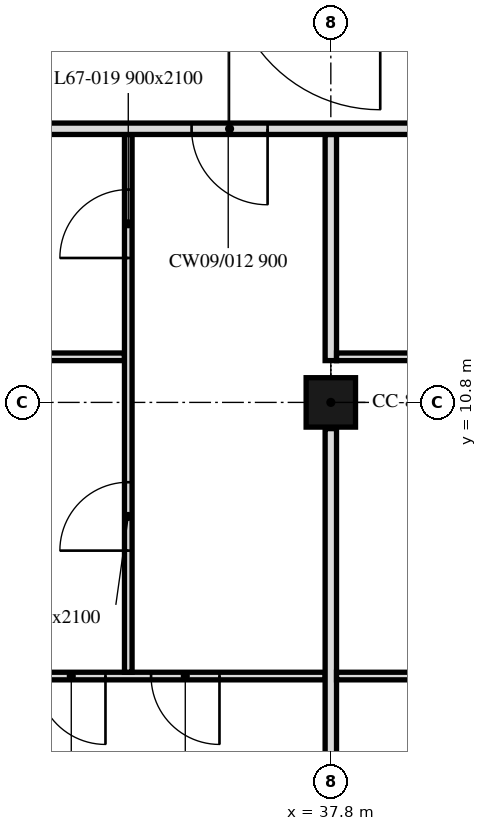
"""IFC4 building model, lengths in metres.
Left out: names, types, materials, properties, quantities, classifications, styles, units other than length and angle.
Written with IfcOpenShell. Run it as: python <this file> out.ifc"""

import sys

from ifc_helpers import new_model, si_unit, direction, frame, frame_2d, origin, origin_2d, place, context, subcontext, project, spatial, rectangle, extrude, element, fill, save


model = new_model("IFC4")
c1 = context("Model", 3, precision=1e-05, world=origin(), true_north=direction((0.0, 1.0)))
c2 = subcontext(c1, "Body", "Model", "MODEL_VIEW")
j1 = project(units=[si_unit("LENGTHUNIT", "METRE"), si_unit("PLANEANGLEUNIT", "RADIAN")], contexts=[c1])
p1 = place(None, origin())
s1 = spatial("IfcSite", under=j1, at=p1, CompositionType="ELEMENT")
p2 = place(p1, origin())
s2 = spatial("IfcBuilding", under=s1, at=p2, CompositionType="ELEMENT")
p3 = place(p2, frame((0.0, 0.0, 275.2)))
s3 = spatial("IfcBuildingStorey", under=s2, at=p3, CompositionType="ELEMENT", Elevation=275.2)
p4 = place(p3, frame((37.8, 10.8, 0.0), z_axis=(0.0, 0.0, 1.0), x_axis=(1.0, 0.0, 0.0)))
e1 = element("IfcColumn", 1, at=p4, inside=s3, PredefinedType="COLUMN", context=c2, shape_type="SweptSolid", body=[
    extrude(rectangle(XDim=0.65, YDim=0.65, at=origin_2d()), origin(), (0.0, 0.0, 1.0), 3.0),
])
p5 = place(p3, frame((37.725, 7.2, 0.0), z_axis=(0.0, 0.0, 1.0), x_axis=(-1.0, 0.0, 0.0)))
e2 = element("IfcWall", 2, at=p5, inside=s3, PredefinedType="PARTITIONING", context=c2, shape_type="SweptSolid", body=[
    extrude(rectangle(XDim=5.25, YDim=0.1, at=frame_2d((2.625, 0.0))), origin(), (0.0, 0.0, 1.0), 3.0),
])
p6 = place(p5, frame((2.89, 0.0, 0.0)))
e3 = element("IfcOpeningElement", 3, at=p6, cuts=e2, PredefinedType="OPENING", context=c2, shape_type="SweptSolid", body=[
    extrude(rectangle(XDim=0.9, YDim=2.1, at=frame_2d((0.45, 1.05))), frame((0.0, 0.05, 0.0), z_axis=(0.0, -1.0, 0.0), x_axis=(1.0, 0.0, 0.0)), (0.0, 0.0, 1.0), 0.1),
])
p7 = place(p5, frame((1.39, 0.0, 0.0)))
e4 = element("IfcOpeningElement", 4, at=p7, cuts=e2, PredefinedType="OPENING", context=c2, shape_type="SweptSolid", body=[
    extrude(rectangle(XDim=0.9, YDim=2.1, at=frame_2d((0.45, 1.05))), frame((0.0, 0.05, 0.0), z_axis=(0.0, -1.0, 0.0), x_axis=(1.0, 0.0, 0.0)), (0.0, 0.0, 1.0), 0.1),
])
p8 = place(p3, frame((35.085, 11.4, 0.0), z_axis=(0.0, 0.0, 1.0), x_axis=(-1.0, 0.0, 0.0)))
e5 = element("IfcWall", 5, at=p8, inside=s3, PredefinedType="PARTITIONING", context=c2, shape_type="SweptSolid", body=[
    extrude(rectangle(XDim=5.585, YDim=0.1, at=frame_2d((2.792, 0.0))), origin(), (0.0, 0.0, 1.0), 2.4),
])
p9 = place(p8, frame((4.435, 0.0, 0.0)))
e6 = element("IfcOpeningElement", 6, at=p9, cuts=e5, PredefinedType="OPENING", context=c2, shape_type="SweptSolid", body=[
    extrude(rectangle(XDim=0.9, YDim=2.1, at=frame_2d((0.45, 1.05))), frame((0.0, 0.05, 0.0), z_axis=(0.0, -1.0, 0.0), x_axis=(1.0, 0.0, 0.0)), (0.0, 0.0, 1.0), 0.1),
])
p10 = place(p3, frame((35.135, 7.25, 0.0), z_axis=(0.0, 0.0, 1.0), x_axis=(0.0, 1.0, 0.0)))
e7 = element("IfcWall", 7, at=p10, inside=s3, PredefinedType="PARTITIONING", context=c2, shape_type="SweptSolid", body=[
    extrude(rectangle(XDim=7.075, YDim=0.1, at=frame_2d((3.538, 0.0))), origin(), (0.0, 0.0, 1.0), 2.4),
])
p11 = place(p10, frame((5.45, 0.0, 0.0)))
e8 = element("IfcOpeningElement", 8, at=p11, cuts=e7, PredefinedType="OPENING", context=c2, shape_type="SweptSolid", body=[
    extrude(rectangle(XDim=0.9, YDim=2.1, at=frame_2d((0.45, 1.05))), frame((0.0, 0.05, 0.0), z_axis=(0.0, -1.0, 0.0), x_axis=(1.0, 0.0, 0.0)), (0.0, 0.0, 1.0), 0.1),
])
p12 = place(p10, frame((1.6, 0.0, 0.0)))
e9 = element("IfcOpeningElement", 9, at=p12, cuts=e7, PredefinedType="OPENING", context=c2, shape_type="SweptSolid", body=[
    extrude(rectangle(XDim=0.9, YDim=2.1, at=frame_2d((0.45, 1.05))), frame((0.0, 0.05, 0.0), z_axis=(0.0, -1.0, 0.0), x_axis=(1.0, 0.0, 0.0)), (0.0, 0.0, 1.0), 0.1),
])
p13 = place(p3, frame((37.8, 5.745, 0.0), z_axis=(0.0, 0.0, 1.0), x_axis=(0.0, 1.0, 0.0)))
e10 = element("IfcWall", 10, at=p13, inside=s3, PredefinedType="PARTITIONING", context=c2, shape_type="SweptSolid", body=[
    extrude(rectangle(XDim=4.71, YDim=0.15, at=frame_2d((2.355, 0.0))), origin(), (0.0, 0.0, 1.0), 2.4),
])
p14 = place(p3, frame((37.8, 11.35, 0.0), z_axis=(0.0, 0.0, 1.0), x_axis=(0.0, 1.0, 0.0)))
e11 = element("IfcWall", 11, at=p14, inside=s3, PredefinedType="PARTITIONING", context=c2, shape_type="SweptSolid", body=[
    extrude(rectangle(XDim=2.975, YDim=0.15, at=frame_2d((1.487, 0.0))), origin(), (0.0, 0.0, 1.0), 2.4),
])
p15 = place(p3, frame((47.849, 7.2, 0.0), z_axis=(0.0, 0.0, 1.0), x_axis=(-1.0, 0.0, 0.0)))
e12 = element("IfcWall", 12, at=p15, inside=s3, PredefinedType="PARTITIONING", context=c2, shape_type="SweptSolid", body=[
    extrude(rectangle(XDim=9.974, YDim=0.1, at=frame_2d((4.987, 0.0))), origin(), (0.0, 0.0, 1.0), 3.0),
])
p16 = place(p15, frame((7.555, 0.0, 0.0)))
e13 = element("IfcOpeningElement", 13, at=p16, cuts=e12, PredefinedType="OPENING", context=c2, shape_type="SweptSolid", body=[
    extrude(rectangle(XDim=0.9, YDim=2.1, at=frame_2d((0.45, 1.05))), frame((0.0, 0.05, 0.0), z_axis=(0.0, -1.0, 0.0), x_axis=(1.0, 0.0, 0.0)), (0.0, 0.0, 1.0), 0.1),
])
p17 = place(p15, frame((5.502, 0.0, 0.0)))
e14 = element("IfcOpeningElement", 14, at=p17, cuts=e12, PredefinedType="OPENING", context=c2, shape_type="SweptSolid", body=[
    extrude(rectangle(XDim=0.9, YDim=2.1, at=frame_2d((0.45, 1.05))), frame((0.0, 0.05, 0.0), z_axis=(0.0, -1.0, 0.0), x_axis=(1.0, 0.0, 0.0)), (0.0, 0.0, 1.0), 0.1),
])
p18 = place(p15, frame((0.25, 0.0, 0.0)))
e15 = element("IfcOpeningElement", 15, at=p18, cuts=e12, PredefinedType="OPENING", context=c2, shape_type="SweptSolid", body=[
    extrude(rectangle(XDim=0.8, YDim=2.1, at=frame_2d((0.4, 1.05))), frame((0.0, 0.05, 0.0), z_axis=(0.0, -1.0, 0.0), x_axis=(1.0, 0.0, 0.0)), (0.0, 0.0, 1.0), 0.1),
])
p19 = place(p3, frame((40.544, 11.4, 0.0), z_axis=(0.0, 0.0, 1.0), x_axis=(-1.0, 0.0, 0.0)))
e16 = element("IfcWall", 16, at=p19, inside=s3, PredefinedType="PARTITIONING", context=c2, shape_type="SweptSolid", body=[
    extrude(rectangle(XDim=2.669, YDim=0.1, at=frame_2d((1.334, 0.0))), origin(), (0.0, 0.0, 1.0), 3.0),
])
p20 = place(p3, frame((47.849, 14.4, 0.0), z_axis=(0.0, 0.0, 1.0), x_axis=(-1.0, 0.0, 0.0)))
e17 = element("IfcWall", 17, at=p20, inside=s3, PredefinedType="PARTITIONING", context=c2, shape_type="SweptSolid", body=[
    extrude(rectangle(XDim=41.698, YDim=0.15, at=frame_2d((20.849, 0.0))), origin(), (0.0, 0.0, 1.0), 2.4),
])
p21 = place(p20, frame((10.881, 0.0, 0.0)))
e18 = element("IfcOpeningElement", 18, at=p21, cuts=e17, PredefinedType="OPENING", context=c2, shape_type="SweptSolid", body=[
    extrude(rectangle(XDim=1.0, YDim=2.1, at=frame_2d((0.5, 1.05))), frame((0.0, 0.075, 0.0), z_axis=(0.0, -1.0, 0.0), x_axis=(1.0, 0.0, 0.0)), (0.0, 0.0, 1.0), 0.15),
])
p22 = place(p20, frame((37.759, 0.0, 0.0)))
e19 = element("IfcOpeningElement", 19, at=p22, cuts=e17, PredefinedType="OPENING", context=c2, shape_type="SweptSolid", body=[
    extrude(rectangle(XDim=1.0, YDim=2.1, at=frame_2d((0.5, 1.05))), frame((0.0, 0.075, 0.0), z_axis=(0.0, -1.0, 0.0), x_axis=(1.0, 0.0, 0.0)), (0.0, 0.0, 1.0), 0.15),
])
p23 = place(p20, frame((22.815, 0.0, 0.0)))
e20 = element("IfcOpeningElement", 20, at=p23, cuts=e17, PredefinedType="OPENING", context=c2, shape_type="SweptSolid", body=[
    extrude(rectangle(XDim=1.0, YDim=2.1, at=frame_2d((0.5, 1.05))), frame((0.0, 0.075, 0.0), z_axis=(0.0, -1.0, 0.0), x_axis=(1.0, 0.0, 0.0)), (0.0, 0.0, 1.0), 0.15),
])
p24 = place(p20, frame((4.85, 0.0, 0.0)))
e21 = element("IfcOpeningElement", 21, at=p24, cuts=e17, PredefinedType="OPENING", context=c2, shape_type="SweptSolid", body=[
    extrude(rectangle(XDim=1.0, YDim=2.1, at=frame_2d((0.5, 1.05))), frame((0.0, 0.075, 0.0), z_axis=(0.0, -1.0, 0.0), x_axis=(1.0, 0.0, 0.0)), (0.0, 0.0, 1.0), 0.15),
])
p25 = place(p11, origin())
e22 = element("IfcDoor", 22, at=p25, inside=s3, OperationType="SINGLE_SWING_RIGHT", PredefinedType="DOOR", context=c2, shape_type="SweptSolid", body=[
    extrude(rectangle(XDim=0.9, YDim=2.1, at=frame_2d((0.45, 1.05))), frame((0.0, 0.025, 0.0), z_axis=(0.0, -1.0, 0.0), x_axis=(1.0, 0.0, 0.0)), (0.0, 0.0, 1.0), 0.05),
])
fill(e8, e22)
p26 = place(p6, origin())
e23 = element("IfcDoor", 23, at=p26, inside=s3, OperationType="SINGLE_SWING_LEFT", PredefinedType="DOOR", context=c2, shape_type="SweptSolid", body=[
    extrude(rectangle(XDim=0.9, YDim=2.1, at=frame_2d((0.45, 1.05))), frame((0.0, 0.025, 0.0), z_axis=(0.0, -1.0, 0.0), x_axis=(1.0, 0.0, 0.0)), (0.0, 0.0, 1.0), 0.05),
])
fill(e3, e23)
p27 = place(p7, origin())
e24 = element("IfcDoor", 24, at=p27, inside=s3, OperationType="SINGLE_SWING_RIGHT", PredefinedType="DOOR", context=c2, shape_type="SweptSolid", body=[
    extrude(rectangle(XDim=0.9, YDim=2.1, at=frame_2d((0.45, 1.05))), frame((0.0, 0.025, 0.0), z_axis=(0.0, -1.0, 0.0), x_axis=(1.0, 0.0, 0.0)), (0.0, 0.0, 1.0), 0.05),
])
fill(e4, e24)
p28 = place(p12, origin())
e25 = element("IfcDoor", 25, at=p28, inside=s3, OperationType="SINGLE_SWING_LEFT", PredefinedType="DOOR", context=c2, shape_type="SweptSolid", body=[
    extrude(rectangle(XDim=0.9, YDim=2.1, at=frame_2d((0.45, 1.05))), frame((0.0, 0.025, 0.0), z_axis=(0.0, -1.0, 0.0), x_axis=(1.0, 0.0, 0.0)), (0.0, 0.0, 1.0), 0.05),
])
fill(e9, e25)
p29 = place(p21, origin())
e26 = element("IfcDoor", 26, at=p29, inside=s3, OperationType="SINGLE_SWING_RIGHT", PredefinedType="DOOR", context=c2, shape_type="SweptSolid", body=[
    extrude(rectangle(XDim=1.0, YDim=2.1, at=frame_2d((0.5, 1.05))), frame((0.0, 0.025, 0.0), z_axis=(0.0, -1.0, 0.0), x_axis=(1.0, 0.0, 0.0)), (0.0, 0.0, 1.0), 0.05),
])
fill(e18, e26)
save(model, sys.argv[1])
